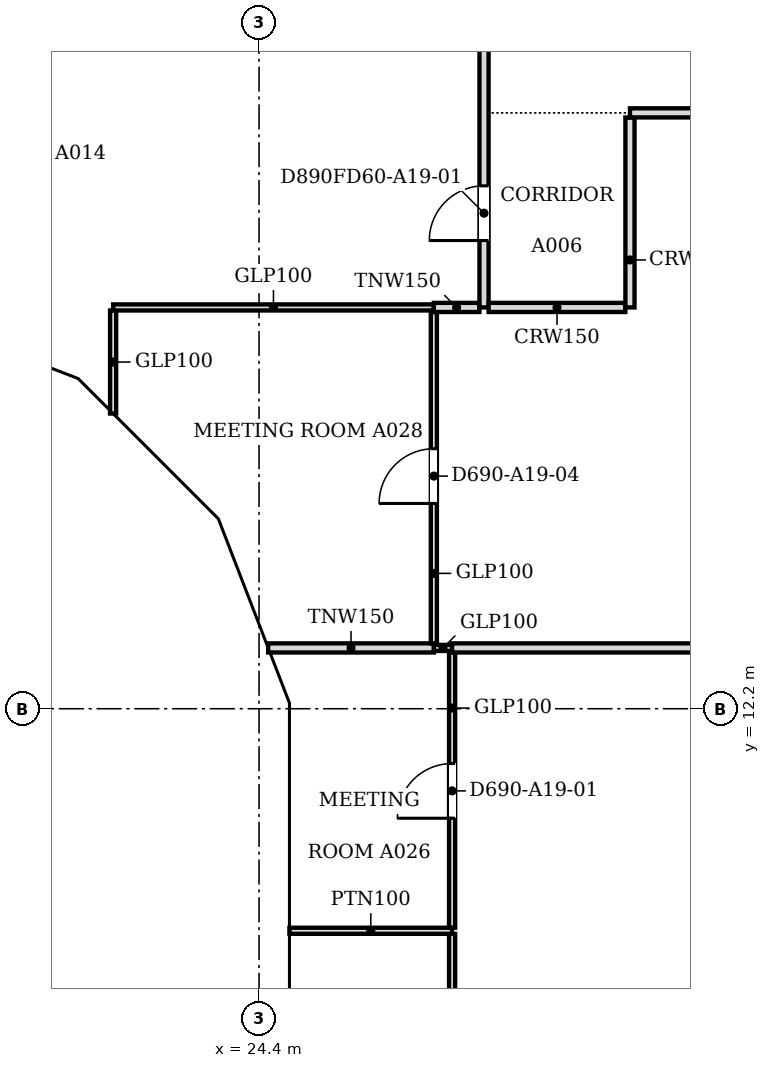
"""IFC4 building model, lengths in metres.
Left out: names, types, materials, properties, quantities, classifications, styles, units other than length and angle.
Written with IfcOpenShell. Run it as: python <this file> out.ifc"""

import sys

from ifc_helpers import new_model, si_unit, direction, frame, frame_2d, origin, place, context, subcontext, project, spatial, polyline, rectangle, outline, extrude, faceted_brep, source, transform, mapped, element, fill, save


model = new_model("IFC4")
c1 = context("Model", 3, precision=1e-05, world=origin(), true_north=direction((0.0, 1.0)))
c2 = subcontext(c1, "Body", "Model", "MODEL_VIEW")
j1 = project(units=[si_unit("LENGTHUNIT", "METRE"), si_unit("PLANEANGLEUNIT", "RADIAN")], contexts=[c1])
p1 = place(None, origin())
s1 = spatial("IfcSite", under=j1, at=p1, CompositionType="ELEMENT")
p2 = place(p1, origin())
s2 = spatial("IfcBuilding", under=s1, at=p2, CompositionType="ELEMENT")
p3 = place(p2, frame((0.0, 0.0, 216.9)))
s3 = spatial("IfcBuildingStorey", under=s2, at=p3, CompositionType="ELEMENT", Elevation=216.9)
m1 = source(origin(), c2, "Body", "Brep", [
    faceted_brep([(3.096, -0.25, 7.536), (0.047, -0.25, 3.856), (0.047, -0.25, 3.744), (3.096, -0.25, 0.064), (0.0, 0.25, 3.8), (3.149, 0.25, 7.6), (3.202, 0.25, 7.536), (3.202, 0.25, 0.064), (3.149, 0.25, 0.0), (3.149, -0.0, 0.0), (3.149, -0.0, 7.6), (0.0, 0.0, 3.8)], [[[0, 1, 2, 3]], [[4, 5, 6, 7, 8]], [[8, 7, 9]], [[6, 5, 10]], [[5, 4, 11, 1, 0, 10]], [[4, 8, 9, 3, 2, 11]], [[11, 2, 1]], [[3, 9, 7, 6, 10, 0]]]),
])
p4 = place(p3, frame((18.346, 18.55, -3.8), z_axis=(0.0, 0.0, 1.0), x_axis=(0.932985567668, -0.359913782069, 0.0)))
e1 = element("IfcWall", 1, at=p4, inside=s3, PredefinedType="SOLIDWALL", context=c2, shape_type="MappedRepresentation", body=[
    mapped(m1, transform((0.0, 0.0, 0.0), scale=1.0)),
])
m2 = source(origin(), c2, "Body", "SweptSolid", [
    extrude(outline(polyline([(2.949, 6.967), (0.325, 3.8), (2.949, 0.633), (2.949, 6.967)])), frame((0.0, 0.26, 0.0), z_axis=(0.0, -1.0, 0.0), x_axis=(1.0, 0.0, 0.0)), (0.0, 0.0, 1.0), 0.52),
])
p5 = place(p4, origin())
e2 = element("IfcOpeningElement", 2, at=p5, cuts=e1, PredefinedType="OPENING", context=c2, shape_type="MappedRepresentation", body=[
    mapped(m2, transform((0.0, 0.0, 0.0), scale=1.0)),
])
m3 = source(origin(), c2, "Body", "Brep", [
    faceted_brep([(0.106, -0.25, 0.064), (3.156, -0.25, 3.736), (3.156, -0.25, 3.864), (0.106, -0.25, 7.536), (0.0, 0.25, 7.536), (0.053, 0.25, 7.6), (3.209, 0.25, 3.8), (0.053, 0.25, 0.0), (0.0, 0.25, 0.064), (3.209, -0.0, 3.8), (0.053, 0.0, 0.0), (0.053, 0.0, 7.6)], [[[0, 1, 2, 3]], [[4, 5, 6, 7, 8]], [[7, 6, 9, 1, 0, 10]], [[6, 5, 11, 3, 2, 9]], [[5, 4, 11]], [[8, 7, 10]], [[8, 10, 0, 3, 11, 4]], [[1, 9, 2]]]),
])
p6 = place(p3, frame((21.248, 17.454, -3.8), z_axis=(0.0, 0.0, 1.0), x_axis=(0.707106781187, -0.707106781187, 0.0)))
e3 = element("IfcWall", 3, at=p6, inside=s3, PredefinedType="SOLIDWALL", context=c2, shape_type="MappedRepresentation", body=[
    mapped(m3, transform((0.0, 0.0, 0.0), scale=1.0)),
])
m4 = source(origin(), c2, "Body", "SweptSolid", [
    extrude(outline(polyline([(0.253, 0.632), (2.884, 3.8), (0.253, 6.968), (0.253, 0.632)])), frame((0.0, 0.26, 0.0), z_axis=(0.0, -1.0, 0.0), x_axis=(1.0, 0.0, 0.0)), (0.0, 0.0, 1.0), 0.52),
])
p7 = place(p6, origin())
e4 = element("IfcOpeningElement", 4, at=p7, cuts=e3, PredefinedType="OPENING", context=c2, shape_type="MappedRepresentation", body=[
    mapped(m4, transform((0.0, 0.0, 0.0), scale=1.0)),
])
m5 = source(origin(), c2, "Body", "Brep", [
    faceted_brep([(3.103, -0.25, 7.544), (0.053, -0.25, 3.864), (0.053, -0.25, 3.736), (3.103, -0.25, 0.056), (0.0, 0.25, 3.8), (3.149, 0.25, 7.6), (3.196, 0.25, 7.543), (3.196, 0.25, 0.057), (3.149, 0.25, 0.0), (3.149, -0.0, 0.0), (3.149, -0.0, 7.6), (0.0, 0.0, 3.8)], [[[0, 1, 2, 3]], [[4, 5, 6, 7, 8]], [[8, 7, 9]], [[6, 5, 10]], [[5, 4, 11, 1, 0, 10]], [[4, 8, 9, 3, 2, 11]], [[11, 2, 1]], [[3, 9, 7, 6, 10, 0]]]),
])
p8 = place(p3, frame((23.517, 15.185, -3.8), z_axis=(0.0, 0.0, 1.0), x_axis=(0.359864468756, -0.933004589553, 0.0)))
e5 = element("IfcWall", 5, at=p8, inside=s3, PredefinedType="SOLIDWALL", context=c2, shape_type="MappedRepresentation", body=[
    mapped(m5, transform((0.0, 0.0, 0.0), scale=1.0)),
])
p9 = place(p8, origin())
e6 = element("IfcOpeningElement", 6, at=p9, cuts=e5, PredefinedType="OPENING", context=c2, shape_type="MappedRepresentation", body=[
    mapped(m2, transform((0.0, 0.0, 0.0), scale=1.0)),
])
m6 = source(origin(), c2, "Body", "Brep", [
    faceted_brep([(0.093, -0.25, 0.057), (3.143, -0.25, 3.8), (0.093, -0.25, 7.543), (0.0, 0.25, 7.544), (0.047, 0.25, 7.6), (3.143, 0.25, 3.8), (0.047, 0.25, 0.0), (0.0, 0.25, 0.056), (0.047, 0.0, 0.0), (0.047, 0.0, 7.6)], [[[0, 1, 2]], [[3, 4, 5, 6, 7]], [[6, 5, 1, 0, 8]], [[5, 4, 9, 2, 1]], [[4, 3, 9]], [[7, 6, 8]], [[7, 8, 0, 2, 9, 3]]]),
])
p10 = place(p3, frame((24.65, 12.293, -3.8), z_axis=(0.0, 0.0, 1.0), x_axis=(0.0, -1.0, 0.0)))
e7 = element("IfcWall", 7, at=p10, inside=s3, PredefinedType="SOLIDWALL", context=c2, shape_type="MappedRepresentation", body=[
    mapped(m6, transform((0.0, 0.0, 0.0), scale=1.0)),
])
m7 = source(origin(), c2, "Body", "SweptSolid", [
    extrude(outline(polyline([(0.247, 0.641), (2.821, 3.8), (0.247, 6.959), (0.247, 0.641)])), frame((0.0, 0.26, 0.0), z_axis=(0.0, -1.0, 0.0), x_axis=(1.0, 0.0, 0.0)), (0.0, 0.0, 1.0), 0.52),
])
p11 = place(p10, origin())
e8 = element("IfcOpeningElement", 8, at=p11, cuts=e7, PredefinedType="OPENING", context=c2, shape_type="MappedRepresentation", body=[
    mapped(m7, transform((0.0, 0.0, 0.0), scale=1.0)),
])
m8 = source(origin(), c2, "Body", "Brep", [
    faceted_brep([(3.003, -0.25, 0.0), (3.05, -0.25, 0.06), (3.05, -0.25, 7.54), (3.003, -0.25, 7.6), (0.0, -0.25, 3.8), (0.0, 0.25, 3.8), (2.957, 0.25, 7.541), (2.957, 0.25, 0.059), (3.003, 0.0, 0.0), (3.003, 0.0, 7.6)], [[[0, 1, 2, 3, 4]], [[5, 6, 7]], [[1, 0, 8]], [[9, 3, 2]], [[6, 5, 4, 3, 9]], [[5, 7, 8, 0, 4]], [[1, 8, 7, 6, 9, 2]]]),
])
p12 = place(p3, frame((24.65, 9.15, -3.8), z_axis=(0.0, 0.0, 1.0), x_axis=(0.0, -1.0, 0.0)))
e9 = element("IfcWall", 9, at=p12, inside=s3, PredefinedType="SOLIDWALL", context=c2, shape_type="MappedRepresentation", body=[
    mapped(m8, transform((0.0, 0.0, 0.0), scale=1.0)),
])
m9 = source(origin(), c2, "Body", "SweptSolid", [
    extrude(outline(polyline([(2.803, 6.944), (0.319, 3.8), (2.803, 0.656), (2.803, 6.944)])), frame((0.0, 0.26, 0.0), z_axis=(0.0, -1.0, 0.0), x_axis=(1.0, 0.0, 0.0)), (0.0, 0.0, 1.0), 0.52),
])
p13 = place(p12, origin())
e10 = element("IfcOpeningElement", 10, at=p13, cuts=e9, PredefinedType="OPENING", context=c2, shape_type="MappedRepresentation", body=[
    mapped(m9, transform((0.0, 0.0, 0.0), scale=1.0)),
])
p14 = place(p2, frame((0.0, 0.0, 220.7)))
s4 = spatial("IfcBuildingStorey", under=s2, at=p14, CompositionType="ELEMENT", Elevation=220.7)
m10 = source(origin(), c2, "Body", "Brep", [
    faceted_brep([(0.093, -0.25, 0.056), (3.143, -0.25, 3.736), (3.143, -0.25, 3.864), (0.093, -0.25, 7.544), (0.0, 0.25, 7.543), (0.047, 0.25, 7.6), (3.196, 0.25, 3.8), (0.047, 0.25, 0.0), (0.0, 0.25, 0.057), (3.196, -0.0, 3.8), (0.047, 0.0, 0.0), (0.047, 0.0, 7.6)], [[[0, 1, 2, 3]], [[4, 5, 6, 7, 8]], [[7, 6, 9, 1, 0, 10]], [[6, 5, 11, 3, 2, 9]], [[5, 4, 11]], [[8, 7, 10]], [[8, 10, 0, 3, 11, 4]], [[1, 9, 2]]]),
])
p15 = place(p14, frame((18.303, 18.567, -3.8), z_axis=(0.0, 0.0, 1.0), x_axis=(0.932978940178, -0.359930961693, 0.0)))
e11 = element("IfcWall", 11, at=p15, inside=s4, PredefinedType="SOLIDWALL", context=c2, shape_type="MappedRepresentation", body=[
    mapped(m10, transform((0.0, 0.0, 0.0), scale=1.0)),
])
m11 = source(origin(), c2, "Body", "SweptSolid", [
    extrude(outline(polyline([(0.247, 0.633), (2.871, 3.8), (0.247, 6.967), (0.247, 0.633)])), frame((0.0, 0.26, 0.0), z_axis=(0.0, -1.0, 0.0), x_axis=(1.0, 0.0, 0.0)), (0.0, 0.0, 1.0), 0.52),
])
p16 = place(p15, origin())
e12 = element("IfcOpeningElement", 12, at=p16, cuts=e11, PredefinedType="OPENING", context=c2, shape_type="MappedRepresentation", body=[
    mapped(m11, transform((0.0, 0.0, 0.0), scale=1.0)),
])
m12 = source(origin(), c2, "Body", "Brep", [
    faceted_brep([(3.103, -0.25, 7.536), (0.053, -0.25, 3.864), (0.053, -0.25, 3.736), (3.103, -0.25, 0.064), (0.0, 0.25, 3.8), (3.156, 0.25, 7.6), (3.209, 0.25, 7.536), (3.209, 0.25, 0.064), (3.156, 0.25, 0.0), (3.156, -0.0, 0.0), (3.156, -0.0, 7.6), (0.0, 0.0, 3.8)], [[[0, 1, 2, 3]], [[4, 5, 6, 7, 8]], [[8, 7, 9]], [[6, 5, 10]], [[5, 4, 11, 1, 0, 10]], [[4, 8, 9, 3, 2, 11]], [[11, 2, 1]], [[3, 9, 7, 6, 10, 0]]]),
])
p17 = place(p14, frame((21.285, 17.417, -3.8), z_axis=(0.0, 0.0, 1.0), x_axis=(0.707106781187, -0.707106781187, 0.0)))
e13 = element("IfcWall", 13, at=p17, inside=s4, PredefinedType="SOLIDWALL", context=c2, shape_type="MappedRepresentation", body=[
    mapped(m12, transform((0.0, 0.0, 0.0), scale=1.0)),
])
m13 = source(origin(), c2, "Body", "SweptSolid", [
    extrude(outline(polyline([(2.956, 6.968), (0.325, 3.8), (2.956, 0.632), (2.956, 6.968)])), frame((0.0, 0.26, 0.0), z_axis=(0.0, -1.0, 0.0), x_axis=(1.0, 0.0, 0.0)), (0.0, 0.0, 1.0), 0.52),
])
p18 = place(p17, origin())
e14 = element("IfcOpeningElement", 14, at=p18, cuts=e13, PredefinedType="OPENING", context=c2, shape_type="MappedRepresentation", body=[
    mapped(m13, transform((0.0, 0.0, 0.0), scale=1.0)),
])
m14 = source(origin(), c2, "Body", "Brep", [
    faceted_brep([(0.106, -0.25, 0.064), (3.156, -0.25, 3.744), (3.156, -0.25, 3.856), (0.106, -0.25, 7.536), (0.0, 0.25, 7.536), (0.053, 0.25, 7.6), (3.202, 0.25, 3.8), (0.053, 0.25, 0.0), (0.0, 0.25, 0.064), (3.202, -0.0, 3.8), (0.053, 0.0, 0.0), (0.053, 0.0, 7.6)], [[[0, 1, 2, 3]], [[4, 5, 6, 7, 8]], [[7, 6, 9, 1, 0, 10]], [[6, 5, 11, 3, 2, 9]], [[5, 4, 11]], [[8, 7, 10]], [[8, 10, 0, 3, 11, 4]], [[1, 9, 2]]]),
])
p19 = place(p14, frame((23.497, 15.234, -3.8), z_axis=(0.0, 0.0, 1.0), x_axis=(0.359913782069, -0.932985567668, 0.0)))
e15 = element("IfcWall", 15, at=p19, inside=s4, PredefinedType="SOLIDWALL", context=c2, shape_type="MappedRepresentation", body=[
    mapped(m14, transform((0.0, 0.0, 0.0), scale=1.0)),
])
m15 = source(origin(), c2, "Body", "SweptSolid", [
    extrude(outline(polyline([(0.253, 0.633), (2.878, 3.8), (0.253, 6.967), (0.253, 0.633)])), frame((0.0, 0.26, 0.0), z_axis=(0.0, -1.0, 0.0), x_axis=(1.0, 0.0, 0.0)), (0.0, 0.0, 1.0), 0.52),
])
p20 = place(p19, origin())
e16 = element("IfcOpeningElement", 16, at=p20, cuts=e15, PredefinedType="OPENING", context=c2, shape_type="MappedRepresentation", body=[
    mapped(m15, transform((0.0, 0.0, 0.0), scale=1.0)),
])
m16 = source(origin(), c2, "Body", "Brep", [
    faceted_brep([(3.096, -0.25, 0.0), (6.1, -0.25, 3.8), (3.096, -0.25, 7.6), (0.047, -0.25, 3.857), (0.047, -0.25, 3.743), (0.0, 0.25, 3.8), (3.096, 0.25, 7.6), (6.053, 0.25, 3.859), (6.053, 0.25, 3.741), (3.096, 0.25, 0.0), (6.1, -0.0, 3.8), (0.0, 0.0, 3.8)], [[[0, 1, 2, 3, 4]], [[5, 6, 7, 8, 9]], [[9, 8, 10, 1, 0]], [[7, 6, 2, 1, 10]], [[6, 5, 11, 3, 2]], [[5, 9, 0, 4, 11]], [[11, 4, 3]], [[10, 8, 7]]]),
])
p21 = place(p14, frame((24.65, 12.247, -3.8), z_axis=(0.0, 0.0, 1.0), x_axis=(0.0, -1.0, 0.0)))
e17 = element("IfcWall", 17, at=p21, inside=s4, PredefinedType="SOLIDWALL", context=c2, shape_type="MappedRepresentation", body=[
    mapped(m16, transform((0.0, 0.0, 0.0), scale=1.0)),
])
m17 = source(origin(), c2, "Body", "SweptSolid", [
    extrude(outline(polyline([(3.094, 0.399), (5.781, 3.8), (3.094, 7.201), (0.323, 3.8), (3.094, 0.399)])), frame((0.0, 0.26, 0.0), z_axis=(0.0, -1.0, 0.0), x_axis=(1.0, 0.0, 0.0)), (0.0, 0.0, 1.0), 0.52),
])
p22 = place(p21, origin())
e18 = element("IfcOpeningElement", 18, at=p22, cuts=e17, PredefinedType="OPENING", context=c2, shape_type="MappedRepresentation", body=[
    mapped(m17, transform((0.0, 0.0, 0.0), scale=1.0)),
])
p23 = place(p3, frame((27.575, 4.2, 0.0), z_axis=(0.0, 0.0, 1.0), x_axis=(0.0, 1.0, 0.0)))
e19 = element("IfcWall", 19, at=p23, inside=s3, PredefinedType="PARTITIONING", context=c2, shape_type="SweptSolid", body=[
    extrude(rectangle(XDim=4.297, YDim=0.1, at=frame_2d((2.148, 0.0))), origin(), (0.0, 0.0, 1.0), 3.067),
])
m18 = source(origin(), c2, "Body", "SweptSolid", [
    extrude(rectangle(XDim=0.9, YDim=2.1, at=frame_2d((0.45, 1.05))), frame((0.0, 0.06, 0.0), z_axis=(0.0, -1.0, 0.0), x_axis=(1.0, 0.0, 0.0)), (0.0, 0.0, 1.0), 0.12),
])
p24 = place(p23, frame((1.7, 0.0, 0.0)))
e20 = element("IfcOpeningElement", 20, at=p24, cuts=e19, PredefinedType="OPENING", context=c2, shape_type="MappedRepresentation", body=[
    mapped(m18, transform((0.0, 0.0, 0.0), scale=1.0)),
])
p25 = place(p3, frame((24.9, 8.548, 0.0), z_axis=(0.0, 0.0, 1.0), x_axis=(1.0, 0.0, 0.0)))
e21 = element("IfcWall", 21, at=p25, inside=s3, PredefinedType="PARTITIONING", context=c2, shape_type="SweptSolid", body=[
    extrude(rectangle(XDim=2.675, YDim=0.1, at=frame_2d((1.337, 0.0))), origin(), (0.0, 0.0, 1.0), 3.067),
])
p26 = place(p3, frame((27.575, 8.599, 0.0), z_axis=(0.0, 0.0, 1.0), x_axis=(0.0, 1.0, 0.0)))
e22 = element("IfcWall", 22, at=p26, inside=s3, PredefinedType="PARTITIONING", context=c2, shape_type="SweptSolid", body=[
    extrude(rectangle(XDim=4.525, YDim=0.1, at=frame_2d((2.263, 0.0))), origin(), (0.0, 0.0, 1.0), 3.067),
])
p27 = place(p26, frame((1.8, 0.0, 0.0)))
e23 = element("IfcOpeningElement", 23, at=p27, cuts=e22, PredefinedType="OPENING", context=c2, shape_type="MappedRepresentation", body=[
    mapped(m18, transform((0.0, 0.0, 0.0), scale=1.0)),
])
p28 = place(p3, frame((24.55, 13.2, 0.0), z_axis=(0.0, 0.0, 1.0), x_axis=(1.0, 0.0, 0.0)))
e24 = element("IfcWall", 24, at=p28, inside=s3, PredefinedType="PARTITIONING", context=c2, shape_type="SweptSolid", body=[
    extrude(rectangle(XDim=2.725, YDim=0.15, at=frame_2d((1.362, 0.0))), origin(), (0.0, 0.0, 1.0), 3.067),
])
p29 = place(p3, frame((27.276, 13.2, 0.0), z_axis=(0.0, 0.0, 1.0), x_axis=(1.0, 0.0, 0.0)))
e25 = element("IfcWall", 25, at=p29, inside=s3, PredefinedType="PARTITIONING", context=c2, shape_type="SweptSolid", body=[
    extrude(rectangle(XDim=0.298, YDim=0.1, at=frame_2d((0.149, 0.0))), origin(), (0.0, 0.0, 1.0), 3.067),
])
p30 = place(p3, frame((27.575, 13.2, 0.0), z_axis=(0.0, 0.0, 1.0), x_axis=(1.0, 0.0, 0.0)))
e26 = element("IfcWall", 26, at=p30, inside=s3, PredefinedType="PARTITIONING", context=c2, shape_type="SweptSolid", body=[
    extrude(rectangle(XDim=16.349, YDim=0.15, at=frame_2d((8.175, 0.0))), origin(), (0.0, 0.0, 1.0), 3.067),
])
p31 = place(p3, frame((27.275, 13.276, 0.0), z_axis=(0.0, 0.0, 1.0), x_axis=(0.0, 1.0, 0.0)))
e27 = element("IfcWall", 27, at=p31, inside=s3, PredefinedType="PARTITIONING", context=c2, shape_type="SweptSolid", body=[
    extrude(rectangle(XDim=5.448, YDim=0.1, at=frame_2d((2.724, 0.0))), origin(), (0.0, 0.0, 1.0), 3.067),
])
p32 = place(p31, frame((2.3, 0.0, 0.0)))
e28 = element("IfcOpeningElement", 28, at=p32, cuts=e27, PredefinedType="OPENING", context=c2, shape_type="MappedRepresentation", body=[
    mapped(m18, transform((0.0, 0.0, 0.0), scale=1.0)),
])
p33 = place(p3, frame((22.0, 17.055, 0.0), z_axis=(0.0, 0.0, 1.0), x_axis=(0.0, 1.0, 0.0)))
e29 = element("IfcWall", 29, at=p33, inside=s3, PredefinedType="PARTITIONING", context=c2, shape_type="SweptSolid", body=[
    extrude(rectangle(XDim=1.694, YDim=0.1, at=frame_2d((0.847, 0.0))), origin(), (0.0, 0.0, 1.0), 3.067),
])
p34 = place(p3, frame((22.0, 18.8, 0.0), z_axis=(0.0, 0.0, 1.0), x_axis=(1.0, 0.0, 0.0)))
e30 = element("IfcWall", 30, at=p34, inside=s3, PredefinedType="PARTITIONING", context=c2, shape_type="SweptSolid", body=[
    extrude(rectangle(XDim=5.274, YDim=0.1, at=frame_2d((2.637, 0.0))), origin(), (0.0, 0.0, 1.0), 3.067),
])
p35 = place(p3, frame((27.275, 18.8, 0.0), z_axis=(0.0, 0.0, 1.0), x_axis=(1.0, 0.0, 0.0)))
e31 = element("IfcWall", 31, at=p35, inside=s3, PredefinedType="PARTITIONING", context=c2, shape_type="SweptSolid", body=[
    extrude(rectangle(XDim=0.749, YDim=0.15, at=frame_2d((0.375, 0.0))), origin(), (0.0, 0.0, 1.0), 3.067),
])
p36 = place(p3, frame((28.1, 18.8, 0.0), z_axis=(0.0, 0.0, 1.0), x_axis=(0.0, 1.0, 0.0)))
e32 = element("IfcWall", 32, at=p36, inside=s3, PredefinedType="PARTITIONING", context=c2, shape_type="SweptSolid", body=[
    extrude(rectangle(XDim=26.024, YDim=0.15, at=frame_2d((13.012, 0.0))), origin(), (0.0, 0.0, 1.0), 3.067),
])
m19 = source(origin(), c2, "Body", "SweptSolid", [
    extrude(rectangle(XDim=0.9, YDim=2.1, at=frame_2d((0.45, 1.05))), frame((0.0, 0.085, 0.0), z_axis=(0.0, -1.0, 0.0), x_axis=(1.0, 0.0, 0.0)), (0.0, 0.0, 1.0), 0.17),
])
p37 = place(p36, frame((1.1, 0.0, 0.0)))
e33 = element("IfcOpeningElement", 33, at=p37, cuts=e32, PredefinedType="OPENING", context=c2, shape_type="MappedRepresentation", body=[
    mapped(m19, transform((0.0, 0.0, 0.0), scale=1.0)),
])
m20 = source(origin(), c2, "Body", "SweptSolid", [
    extrude(rectangle(XDim=1.0, YDim=2.1, at=frame_2d((0.5, 1.05))), frame((0.0, 0.085, 0.0), z_axis=(0.0, -1.0, 0.0), x_axis=(1.0, 0.0, 0.0)), (0.0, 0.0, 1.0), 0.17),
])
p38 = place(p36, frame((14.201, 0.0, 0.0)))
e34 = element("IfcOpeningElement", 34, at=p38, cuts=e32, PredefinedType="OPENING", context=c2, shape_type="MappedRepresentation", body=[
    mapped(m20, transform((0.0, 0.0, 0.0), scale=1.0)),
])
p39 = place(p36, frame((8.1, 0.0, 0.0)))
e35 = element("IfcOpeningElement", 35, at=p39, cuts=e32, PredefinedType="OPENING", context=c2, shape_type="MappedRepresentation", body=[
    mapped(m20, transform((0.0, 0.0, 0.0), scale=1.0)),
])
p40 = place(p36, frame((21.5, 0.0, 0.0)))
e36 = element("IfcOpeningElement", 36, at=p40, cuts=e32, PredefinedType="OPENING", context=c2, shape_type="MappedRepresentation", body=[
    mapped(m19, transform((0.0, 0.0, 0.0), scale=1.0)),
])
p41 = place(p3, frame((28.176, 18.8, 0.0), z_axis=(0.0, 0.0, 1.0), x_axis=(1.0, 0.0, 0.0)))
e37 = element("IfcWall", 37, at=p41, inside=s3, PredefinedType="PARTITIONING", context=c2, shape_type="SweptSolid", body=[
    extrude(rectangle(XDim=2.248, YDim=0.15, at=frame_2d((1.124, 0.0))), origin(), (0.0, 0.0, 1.0), 3.067),
])
p42 = place(p3, frame((30.5, 18.8, 0.0), z_axis=(0.0, 0.0, 1.0), x_axis=(0.0, 1.0, 0.0)))
e38 = element("IfcWall", 38, at=p42, inside=s3, PredefinedType="PARTITIONING", context=c2, shape_type="SweptSolid", body=[
    extrude(rectangle(XDim=3.124, YDim=0.15, at=frame_2d((1.562, 0.0))), origin(), (0.0, 0.0, 1.0), 3.067),
])
p43 = place(p3, frame((30.5, 22.0, 0.0), z_axis=(0.0, 0.0, 1.0), x_axis=(1.0, 0.0, 0.0)))
e39 = element("IfcWall", 39, at=p43, inside=s3, PredefinedType="PARTITIONING", context=c2, shape_type="SweptSolid", body=[
    extrude(rectangle(XDim=13.5, YDim=0.15, at=frame_2d((6.75, 0.0))), origin(), (0.0, 0.0, 1.0), 3.067),
])
m21 = source(origin(), c2, "Body", "SweptSolid", [
    extrude(rectangle(XDim=0.9, YDim=2.1, at=frame_2d((0.45, 1.05))), frame((0.0, 0.025, 0.0), z_axis=(0.0, -1.0, 0.0), x_axis=(1.0, 0.0, 0.0)), (0.0, 0.0, 1.0), 0.05),
])
p44 = place(p37, origin())
e40 = element("IfcDoor", 40, at=p44, inside=s3, OperationType="SINGLE_SWING_LEFT", PredefinedType="DOOR", context=c2, shape_type="MappedRepresentation", body=[
    mapped(m21, transform((0.0, 0.0, 0.0), scale=1.0)),
])
fill(e33, e40)
p45 = place(p27, origin())
e41 = element("IfcDoor", 41, at=p45, inside=s3, OperationType="SINGLE_SWING_LEFT", PredefinedType="DOOR", context=c2, shape_type="MappedRepresentation", body=[
    mapped(m21, transform((0.0, 0.0, 0.0), scale=1.0)),
])
fill(e23, e41)
p46 = place(p32, origin())
e42 = element("IfcDoor", 42, at=p46, inside=s3, OperationType="SINGLE_SWING_LEFT", PredefinedType="DOOR", context=c2, shape_type="MappedRepresentation", body=[
    mapped(m21, transform((0.0, 0.0, 0.0), scale=1.0)),
])
fill(e28, e42)
save(model, sys.argv[1])
